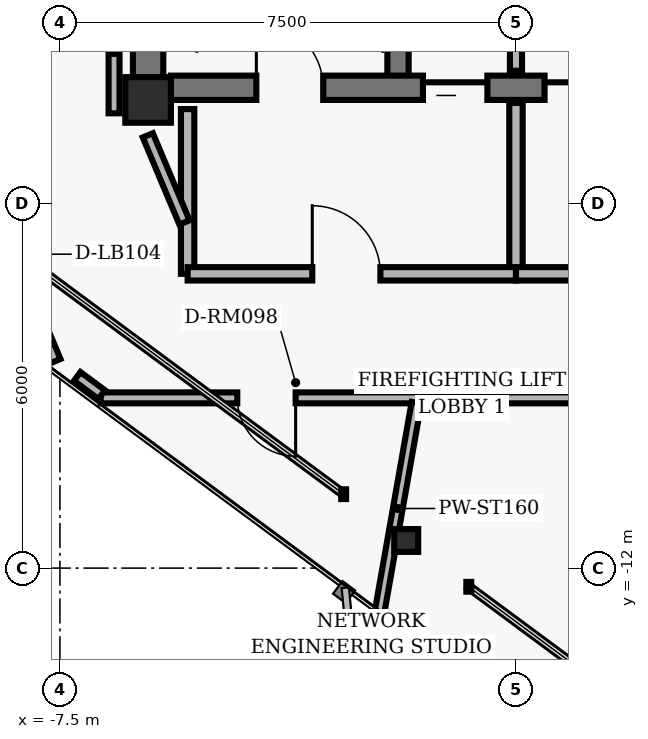
"""IFC4 building model, lengths in metres.
Left out: names, types, materials, properties, quantities, classifications, styles, units other than length and angle.
Written with IfcOpenShell. Run it as: python <this file> out.ifc"""

import sys

from ifc_helpers import new_model, si_unit, direction, frame, frame_2d, origin, origin_2d, place, context, subcontext, project, spatial, rectangle, hollow_rectangle, i_section, extrude, element, fill, save


model = new_model("IFC4")
c1 = context("Model", 3, precision=1e-05, world=origin(), true_north=direction((0.0, 1.0)))
c2 = subcontext(c1, "Body", "Model", "MODEL_VIEW")
j1 = project(units=[si_unit("LENGTHUNIT", "METRE"), si_unit("PLANEANGLEUNIT", "RADIAN")], contexts=[c1])
p1 = place(None, origin())
s1 = spatial("IfcSite", under=j1, at=p1, CompositionType="ELEMENT")
p2 = place(p1, origin())
s2 = spatial("IfcBuilding", under=s1, at=p2, CompositionType="ELEMENT")
p3 = place(p2, frame((0.0, 0.0, 214.88)))
s3 = spatial("IfcBuildingStorey", under=s2, at=p3, CompositionType="ELEMENT", Elevation=214.88)
p4 = place(p3, frame((-6.05, -4.3, 0.0), z_axis=(0.0, 0.0, 1.0), x_axis=(1.0, 0.0, 0.0)))
e1 = element("IfcColumn", 1, at=p4, inside=s3, PredefinedType="COLUMN", context=c2, shape_type="SweptSolid", body=[
    extrude(hollow_rectangle(XDim=0.75, YDim=0.75, WallThickness=0.05, InnerFilletRadius=0.02, OuterFilletRadius=0.04, at=origin_2d()), origin(), (0.0, 0.0, 1.0), 3.04),
])
p5 = place(p3, frame((-6.05, -3.925, 0.0), z_axis=(0.0, 0.0, 1.0), x_axis=(0.0, 1.0, 0.0)))
e2 = element("IfcWall", 2, at=p5, inside=s3, PredefinedType="SHEAR", context=c2, shape_type="SweptSolid", body=[
    extrude(rectangle(XDim=3.55, YDim=0.5, at=frame_2d((1.775, 0.0))), origin(), (0.0, 0.0, 1.0), 2.798),
])
p6 = place(p3, frame((-1.94, -4.1, 0.0), z_axis=(0.0, 0.0, 1.0), x_axis=(0.0, 1.0, 0.0)))
e3 = element("IfcWall", 3, at=p6, inside=s3, PredefinedType="SHEAR", context=c2, shape_type="SweptSolid", body=[
    extrude(rectangle(XDim=8.2, YDim=0.35, at=frame_2d((4.1, 0.0))), origin(), (0.0, 0.0, 1.0), 2.798),
])
p7 = place(p3, frame((-5.675, -4.1, 0.0), z_axis=(0.0, 0.0, 1.0), x_axis=(1.0, 0.0, 0.0)))
e4 = element("IfcWall", 4, at=p7, inside=s3, PredefinedType="SHEAR", context=c2, shape_type="SweptSolid", body=[
    extrude(rectangle(XDim=11.35, YDim=0.4, at=frame_2d((5.675, 0.0))), origin(), (0.0, 0.0, 1.0), 2.798),
])
p8 = place(p7, frame((1.405, 0.0, 0.0)))
e5 = element("IfcOpeningElement", 5, at=p8, cuts=e4, PredefinedType="OPENING", context=c2, shape_type="SweptSolid", body=[
    extrude(rectangle(XDim=1.1, YDim=2.04, at=frame_2d((0.55, 1.02))), frame((0.0, 0.21, 0.0), z_axis=(0.0, -1.0, 0.0), x_axis=(1.0, 0.0, 0.0)), (0.0, 0.0, 1.0), 0.42),
])
p9 = place(p7, frame((8.845, 0.0, 0.0)))
e6 = element("IfcOpeningElement", 6, at=p9, cuts=e4, PredefinedType="OPENING", context=c2, shape_type="SweptSolid", body=[
    extrude(rectangle(XDim=1.1, YDim=2.04, at=frame_2d((0.55, 1.02))), frame((0.0, 0.21, 0.0), z_axis=(0.0, -1.0, 0.0), x_axis=(1.0, 0.0, 0.0)), (0.0, 0.0, 1.0), 0.42),
])
p10 = place(p7, frame((4.145, 0.0, 0.0)))
e7 = element("IfcOpeningElement", 7, at=p10, cuts=e4, PredefinedType="OPENING", context=c2, shape_type="SweptSolid", body=[
    extrude(rectangle(XDim=1.06, YDim=2.04, at=frame_2d((0.53, 1.02))), frame((0.0, 0.21, 0.0), z_axis=(0.0, -1.0, 0.0), x_axis=(1.0, 0.0, 0.0)), (0.0, 0.0, 1.0), 0.42),
])
p11 = place(p7, frame((6.145, 0.0, 0.0)))
e8 = element("IfcOpeningElement", 8, at=p11, cuts=e4, PredefinedType="OPENING", context=c2, shape_type="SweptSolid", body=[
    extrude(rectangle(XDim=1.06, YDim=2.04, at=frame_2d((0.53, 1.02))), frame((0.0, 0.21, 0.0), z_axis=(0.0, -1.0, 0.0), x_axis=(1.0, 0.0, 0.0)), (0.0, 0.0, 1.0), 0.42),
])
p12 = place(p3, frame((-1.805, -11.546, 0.0), z_axis=(0.0, 0.0, 1.0), x_axis=(1.0, 0.0, 0.0)))
e9 = element("IfcColumn", 9, at=p12, inside=s3, PredefinedType="COLUMN", context=c2, shape_type="SweptSolid", body=[
    extrude(i_section(OverallWidth=0.394, OverallDepth=0.375, WebThickness=0.017, FlangeThickness=0.028, FilletRadius=0.016, at=origin_2d()), origin(), (0.0, 0.0, 1.0), 3.04),
])
p13 = place(p3, frame((0.0, -3.82, 0.0), z_axis=(0.0, 0.0, 1.0), x_axis=(0.0, 1.0, 0.0)))
e10 = element("IfcWall", 10, at=p13, inside=s3, PredefinedType="PARTITIONING", context=c2, shape_type="SweptSolid", body=[
    extrude(rectangle(XDim=2.67, YDim=0.2, at=frame_2d((1.335, 0.0))), origin(), (0.0, 0.0, 1.0), 2.773),
])
p14 = place(p3, frame((-5.4, -7.16, 0.0), z_axis=(0.0, 0.0, 1.0), x_axis=(0.0, 1.0, 0.0)))
e11 = element("IfcWall", 11, at=p14, inside=s3, PredefinedType="PARTITIONING", context=c2, shape_type="SweptSolid", body=[
    extrude(rectangle(XDim=2.71, YDim=0.22, at=frame_2d((1.355, 0.0))), origin(), (0.0, 0.0, 1.0), 2.773),
])
p15 = place(p3, frame((0.0, -7.16, 0.0), z_axis=(0.0, 0.0, 1.0), x_axis=(0.0, 1.0, 0.0)))
e12 = element("IfcWall", 12, at=p15, inside=s3, PredefinedType="PARTITIONING", context=c2, shape_type="SweptSolid", body=[
    extrude(rectangle(XDim=2.81, YDim=0.22, at=frame_2d((1.405, 0.0))), origin(), (0.0, 0.0, 1.0), 2.773),
])
p16 = place(p3, frame((-5.4, -7.16, 0.0), z_axis=(0.0, 0.0, 1.0), x_axis=(1.0, 0.0, 0.0)))
e13 = element("IfcWall", 13, at=p16, inside=s3, PredefinedType="PARTITIONING", context=c2, shape_type="SweptSolid", body=[
    extrude(rectangle(XDim=5.4, YDim=0.22, at=frame_2d((2.7, 0.0))), origin(), (0.0, 0.0, 1.0), 2.395),
])
p17 = place(p16, frame((2.05, 0.0, 0.0)))
e14 = element("IfcOpeningElement", 14, at=p17, cuts=e13, PredefinedType="OPENING", context=c2, shape_type="SweptSolid", body=[
    extrude(rectangle(XDim=1.12, YDim=2.02, at=frame_2d((0.56, 1.01))), frame((0.0, 0.12, 0.0), z_axis=(0.0, -1.0, 0.0), x_axis=(1.0, 0.0, 0.0)), (0.0, 0.0, 1.0), 0.24),
])
p18 = place(p3, frame((0.0, -7.16, 0.0), z_axis=(0.0, 0.0, 1.0), x_axis=(1.0, 0.0, 0.0)))
e15 = element("IfcWall", 15, at=p18, inside=s3, PredefinedType="PARTITIONING", context=c2, shape_type="SweptSolid", body=[
    extrude(rectangle(XDim=5.4, YDim=0.22, at=frame_2d((2.7, 0.0))), origin(), (0.0, 0.0, 1.0), 2.773),
])
p19 = place(p18, frame((2.05, 0.0, 0.0)))
e16 = element("IfcOpeningElement", 16, at=p19, cuts=e15, PredefinedType="OPENING", context=c2, shape_type="SweptSolid", body=[
    extrude(rectangle(XDim=1.12, YDim=2.02, at=frame_2d((0.56, 1.01))), frame((0.0, 0.12, 0.0), z_axis=(0.0, -1.0, 0.0), x_axis=(1.0, 0.0, 0.0)), (0.0, 0.0, 1.0), 0.24),
])
p20 = place(p3, frame((-7.574, -8.596, 0.0), z_axis=(0.0, 0.0, 1.0), x_axis=(-0.38757793583, 0.921836939842, 0.0)))
e17 = element("IfcWall", 17, at=p20, inside=s3, PredefinedType="PARTITIONING", context=c2, shape_type="SweptSolid", body=[
    extrude(rectangle(XDim=4.625, YDim=0.18, at=frame_2d((2.313, 0.0))), origin(), (0.0, 0.0, 1.0), 2.773),
])
p21 = place(p20, frame((1.803, 0.0, 0.0)))
e18 = element("IfcOpeningElement", 18, at=p21, cuts=e17, PredefinedType="OPENING", context=c2, shape_type="SweptSolid", body=[
    extrude(rectangle(XDim=1.02, YDim=2.02, at=frame_2d((0.51, 1.01))), frame((0.0, 0.1, 0.0), z_axis=(0.0, -1.0, 0.0), x_axis=(1.0, 0.0, 0.0)), (0.0, 0.0, 1.0), 0.2),
])
p22 = place(p3, frame((-6.61, -3.541, 0.0), z_axis=(0.0, 0.0, 1.0), x_axis=(0.0, -1.0, 0.0)))
e19 = element("IfcWall", 19, at=p22, inside=s3, PredefinedType="PARTITIONING", context=c2, shape_type="SweptSolid", body=[
    extrude(rectangle(XDim=0.979, YDim=0.18, at=frame_2d((0.489, 0.0))), origin(), (0.0, 0.0, 1.0), 2.773),
])
p23 = place(p3, frame((-6.055, -4.882, 0.0), z_axis=(0.0, 0.0, 1.0), x_axis=(0.387579540458, -0.921836265189, 0.0)))
e20 = element("IfcWall", 20, at=p23, inside=s3, PredefinedType="PARTITIONING", context=c2, shape_type="SweptSolid", body=[
    extrude(rectangle(XDim=1.555, YDim=0.18, at=frame_2d((0.777, 0.0))), origin(), (0.0, 0.0, 1.0), 2.253),
])
p24 = place(p3, frame((6.01, -9.2, 0.0), z_axis=(0.0, 0.0, 1.0), x_axis=(-1.0, 0.0, 0.0)))
e21 = element("IfcWall", 21, at=p24, inside=s3, PredefinedType="PARTITIONING", context=c2, shape_type="SweptSolid", body=[
    extrude(rectangle(XDim=12.84, YDim=0.18, at=frame_2d((6.42, 0.0))), origin(), (0.0, 0.0, 1.0), 2.773),
])
p25 = place(p24, frame((9.634, 0.0, 0.0)))
e22 = element("IfcOpeningElement", 22, at=p25, cuts=e21, PredefinedType="OPENING", context=c2, shape_type="SweptSolid", body=[
    extrude(rectangle(XDim=0.96, YDim=2.02, at=frame_2d((0.48, 1.01))), frame((0.0, 0.1, 0.0), z_axis=(0.0, -1.0, 0.0), x_axis=(1.0, 0.0, 0.0)), (0.0, 0.0, 1.0), 0.2),
])
p26 = place(p24, frame((3.473, 0.0, 0.0)))
e23 = element("IfcOpeningElement", 23, at=p26, cuts=e21, PredefinedType="OPENING", context=c2, shape_type="SweptSolid", body=[
    extrude(rectangle(XDim=0.96, YDim=2.02, at=frame_2d((0.48, 1.01))), frame((0.0, 0.1, 0.0), z_axis=(0.0, -1.0, 0.0), x_axis=(1.0, 0.0, 0.0)), (0.0, 0.0, 1.0), 0.2),
])
p27 = place(p3, frame((-6.812, -9.146, 0.0), z_axis=(0.0, 0.0, 1.0), x_axis=(-0.803893055119, 0.594773869577, 0.0)))
e24 = element("IfcWall", 24, at=p27, inside=s3, PredefinedType="PARTITIONING", context=c2, shape_type="SweptSolid", body=[
    extrude(rectangle(XDim=0.502, YDim=0.18, at=frame_2d((0.251, 0.0))), origin(), (0.0, 0.0, 1.0), 2.773),
])
p28 = place(p3, frame((-1.636, -9.28, 0.0), z_axis=(0.0, 0.0, 1.0), x_axis=(-0.17367100135, -0.984803728308, 0.0)))
e25 = element("IfcWall", 25, at=p28, inside=s3, PredefinedType="PARTITIONING", context=c2, shape_type="SweptSolid", body=[
    extrude(rectangle(XDim=3.533, YDim=0.16, at=frame_2d((1.766, 0.0))), origin(), (0.0, 0.0, 1.0), 2.773),
])
p29 = place(p8, origin())
e26 = element("IfcDoor", 26, at=p29, inside=s3, OperationType="SINGLE_SWING_LEFT", PredefinedType="DOOR", context=c2, shape_type="SweptSolid", body=[
    extrude(rectangle(XDim=1.1, YDim=2.04, at=frame_2d((0.55, 1.02))), frame((0.0, 0.025, 0.0), z_axis=(0.0, -1.0, 0.0), x_axis=(1.0, 0.0, 0.0)), (0.0, 0.0, 1.0), 0.05),
])
fill(e5, e26)
p30 = place(p10, origin())
e27 = element("IfcDoor", 27, at=p30, inside=s3, OperationType="SLIDING_TO_LEFT", PredefinedType="DOOR", context=c2, shape_type="SweptSolid", body=[
    extrude(rectangle(XDim=1.06, YDim=2.04, at=frame_2d((0.53, 1.02))), frame((0.0, 0.025, 0.0), z_axis=(0.0, -1.0, 0.0), x_axis=(1.0, 0.0, 0.0)), (0.0, 0.0, 1.0), 0.05),
])
fill(e7, e27)
p31 = place(p11, origin())
e28 = element("IfcDoor", 28, at=p31, inside=s3, OperationType="SLIDING_TO_RIGHT", PredefinedType="DOOR", context=c2, shape_type="SweptSolid", body=[
    extrude(rectangle(XDim=1.06, YDim=2.04, at=frame_2d((0.53, 1.02))), frame((0.0, 0.025, 0.0), z_axis=(0.0, -1.0, 0.0), x_axis=(1.0, 0.0, 0.0)), (0.0, 0.0, 1.0), 0.05),
])
fill(e8, e28)
p32 = place(p17, origin())
e29 = element("IfcDoor", 29, at=p32, inside=s3, OperationType="SINGLE_SWING_LEFT", PredefinedType="DOOR", context=c2, shape_type="SweptSolid", body=[
    extrude(rectangle(XDim=1.12, YDim=2.02, at=frame_2d((0.56, 1.01))), frame((0.0, 0.025, 0.0), z_axis=(0.0, -1.0, 0.0), x_axis=(1.0, 0.0, 0.0)), (0.0, 0.0, 1.0), 0.05),
])
fill(e14, e29)
p33 = place(p25, origin())
e30 = element("IfcDoor", 30, at=p33, inside=s3, OperationType="SINGLE_SWING_LEFT", PredefinedType="DOOR", context=c2, shape_type="SweptSolid", body=[
    extrude(rectangle(XDim=0.96, YDim=2.02, at=frame_2d((0.48, 1.01))), frame((0.0, 0.025, 0.0), z_axis=(0.0, -1.0, 0.0), x_axis=(1.0, 0.0, 0.0)), (0.0, 0.0, 1.0), 0.05),
])
fill(e22, e30)
save(model, sys.argv[1])
